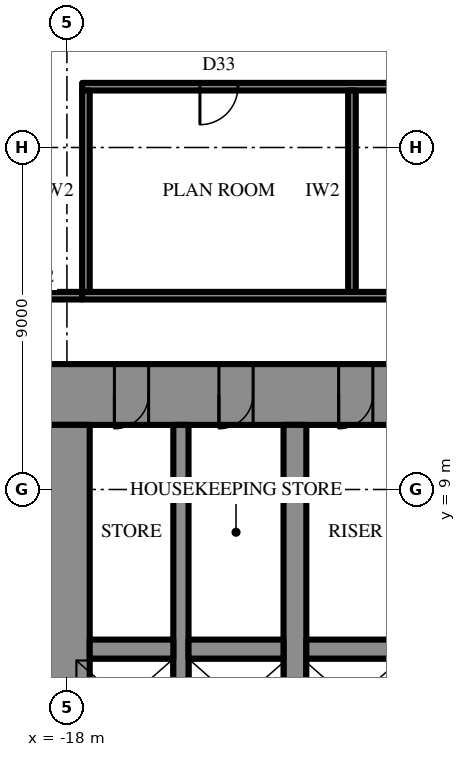
"""IFC4 building model, lengths in metres.
Left out: names, types, materials, properties, quantities, classifications, styles, units other than length and angle.
Written with IfcOpenShell. Run it as: python <this file> out.ifc"""

import sys

from ifc_helpers import new_model, si_unit, direction, frame, frame_2d, origin, place, context, subcontext, project, spatial, rectangle, extrude, element, fill, save


model = new_model("IFC4")
c1 = context("Model", 3, precision=1e-05, world=origin(), true_north=direction((0.0, 1.0)))
c2 = subcontext(c1, "Body", "Model", "MODEL_VIEW")
j1 = project(units=[si_unit("LENGTHUNIT", "METRE"), si_unit("PLANEANGLEUNIT", "RADIAN")], contexts=[c1])
p1 = place(None, origin())
s1 = spatial("IfcSite", under=j1, at=p1, CompositionType="ELEMENT")
p2 = place(p1, origin())
s2 = spatial("IfcBuilding", under=s1, at=p2, CompositionType="ELEMENT")
p3 = place(p2, frame((0.0, 0.0, 52.9)))
s3 = spatial("IfcBuildingStorey", under=s2, at=p3, CompositionType="ELEMENT", Elevation=52.9)
p4 = place(p3, frame((-18.6, 11.5, 0.0), z_axis=(0.0, 0.0, 1.0), x_axis=(1.0, 0.0, 0.0)))
e1 = element("IfcWall", 1, at=p4, inside=s3, PredefinedType="SHEAR", context=c2, shape_type="SweptSolid", body=[
    extrude(rectangle(XDim=37.2, YDim=1.6, at=frame_2d((18.6, 0.0))), origin(), (0.0, 0.0, 1.0), 4.2),
])
p5 = place(p4, frame((19.45, 0.0, 0.0)))
e2 = element("IfcOpeningElement", 2, at=p5, cuts=e1, PredefinedType="OPENING", context=c2, shape_type="SweptSolid", body=[
    extrude(rectangle(XDim=0.9, YDim=2.2, at=frame_2d((0.45, 1.1))), frame((0.0, 0.81, 0.0), z_axis=(0.0, -1.0, 0.0), x_axis=(1.0, 0.0, 0.0)), (0.0, 0.0, 1.0), 1.62),
])
p6 = place(p4, frame((22.45, 0.0, 0.0)))
e3 = element("IfcOpeningElement", 3, at=p6, cuts=e1, PredefinedType="OPENING", context=c2, shape_type="SweptSolid", body=[
    extrude(rectangle(XDim=0.9, YDim=2.2, at=frame_2d((0.45, 1.1))), frame((0.0, 0.81, 0.0), z_axis=(0.0, -1.0, 0.0), x_axis=(1.0, 0.0, 0.0)), (0.0, 0.0, 1.0), 1.62),
])
p7 = place(p4, frame((25.5, 0.0, 0.0)))
e4 = element("IfcOpeningElement", 4, at=p7, cuts=e1, PredefinedType="OPENING", context=c2, shape_type="SweptSolid", body=[
    extrude(rectangle(XDim=1.0, YDim=2.2, at=frame_2d((0.5, 1.1))), frame((0.0, 0.81, 0.0), z_axis=(0.0, -1.0, 0.0), x_axis=(1.0, 0.0, 0.0)), (0.0, 0.0, 1.0), 1.62),
])
p8 = place(p4, frame((1.85, 0.0, 0.0)))
e5 = element("IfcOpeningElement", 5, at=p8, cuts=e1, PredefinedType="OPENING", context=c2, shape_type="SweptSolid", body=[
    extrude(rectangle(XDim=0.9, YDim=2.2, at=frame_2d((0.45, 1.1))), frame((0.0, 0.81, 0.0), z_axis=(0.0, -1.0, 0.0), x_axis=(1.0, 0.0, 0.0)), (0.0, 0.0, 1.0), 1.62),
])
p9 = place(p4, frame((4.6, 0.0, 0.0)))
e6 = element("IfcOpeningElement", 6, at=p9, cuts=e1, PredefinedType="OPENING", context=c2, shape_type="SweptSolid", body=[
    extrude(rectangle(XDim=0.9, YDim=2.2, at=frame_2d((0.45, 1.1))), frame((0.0, 0.81, 0.0), z_axis=(0.0, -1.0, 0.0), x_axis=(1.0, 0.0, 0.0)), (0.0, 0.0, 1.0), 1.62),
])
p10 = place(p4, frame((7.75, 0.0, 0.0)))
e7 = element("IfcOpeningElement", 7, at=p10, cuts=e1, PredefinedType="OPENING", context=c2, shape_type="SweptSolid", body=[
    extrude(rectangle(XDim=0.9, YDim=2.2, at=frame_2d((0.45, 1.1))), frame((0.0, 0.81, 0.0), z_axis=(0.0, -1.0, 0.0), x_axis=(1.0, 0.0, 0.0)), (0.0, 0.0, 1.0), 1.62),
])
p11 = place(p4, frame((28.55, 0.0, 0.0)))
e8 = element("IfcOpeningElement", 8, at=p11, cuts=e1, PredefinedType="OPENING", context=c2, shape_type="SweptSolid", body=[
    extrude(rectangle(XDim=0.9, YDim=2.2, at=frame_2d((0.45, 1.1))), frame((0.0, 0.81, 0.0), z_axis=(0.0, -1.0, 0.0), x_axis=(1.0, 0.0, 0.0)), (0.0, 0.0, 1.0), 1.62),
])
p12 = place(p4, frame((31.7, 0.0, 0.0)))
e9 = element("IfcOpeningElement", 9, at=p12, cuts=e1, PredefinedType="OPENING", context=c2, shape_type="SweptSolid", body=[
    extrude(rectangle(XDim=0.9, YDim=2.2, at=frame_2d((0.45, 1.1))), frame((0.0, 0.81, 0.0), z_axis=(0.0, -1.0, 0.0), x_axis=(1.0, 0.0, 0.0)), (0.0, 0.0, 1.0), 1.62),
])
p13 = place(p4, frame((34.45, 0.0, 0.0)))
e10 = element("IfcOpeningElement", 10, at=p13, cuts=e1, PredefinedType="OPENING", context=c2, shape_type="SweptSolid", body=[
    extrude(rectangle(XDim=0.9, YDim=2.2, at=frame_2d((0.45, 1.1))), frame((0.0, 0.81, 0.0), z_axis=(0.0, -1.0, 0.0), x_axis=(1.0, 0.0, 0.0)), (0.0, 0.0, 1.0), 1.62),
])
p14 = place(p3, frame((-18.0, 10.7, 0.0), z_axis=(0.0, 0.0, 1.0), x_axis=(0.0, -1.0, 0.0)))
e11 = element("IfcWall", 11, at=p14, inside=s3, PredefinedType="SHEAR", context=c2, shape_type="SweptSolid", body=[
    extrude(rectangle(XDim=21.4, YDim=1.2, at=frame_2d((10.7, 0.0))), origin(), (0.0, 0.0, 1.0), 4.2),
])
p15 = place(p14, frame((9.8, 0.0, 0.0)))
e12 = element("IfcOpeningElement", 12, at=p15, cuts=e11, PredefinedType="OPENING", context=c2, shape_type="SweptSolid", body=[
    extrude(rectangle(XDim=1.8, YDim=2.4, at=frame_2d((0.9, 1.2))), frame((0.0, 0.61, 0.0), z_axis=(0.0, -1.0, 0.0), x_axis=(1.0, 0.0, 0.0)), (0.0, 0.0, 1.0), 1.22),
])
p16 = place(p3, frame((-12.0, -10.7, 0.0), z_axis=(0.0, 0.0, 1.0), x_axis=(0.0, 1.0, 0.0)))
e13 = element("IfcWall", 13, at=p16, inside=s3, PredefinedType="SHEAR", context=c2, shape_type="SweptSolid", body=[
    extrude(rectangle(XDim=21.4, YDim=0.6, at=frame_2d((10.7, 0.0))), origin(), (0.0, 0.0, 1.0), 4.2),
])
p17 = place(p16, frame((9.8, 0.0, 0.0)))
e14 = element("IfcOpeningElement", 14, at=p17, cuts=e13, PredefinedType="OPENING", context=c2, shape_type="SweptSolid", body=[
    extrude(rectangle(XDim=1.8, YDim=2.4, at=frame_2d((0.9, 1.2))), frame((0.0, 0.31, 0.0), z_axis=(0.0, -1.0, 0.0), x_axis=(1.0, 0.0, 0.0)), (0.0, 0.0, 1.0), 0.62),
])
p18 = place(p3, frame((-15.0, -10.7, 0.0), z_axis=(0.0, 0.0, 1.0), x_axis=(0.0, 1.0, 0.0)))
e15 = element("IfcWall", 15, at=p18, inside=s3, PredefinedType="SHEAR", context=c2, shape_type="SweptSolid", body=[
    extrude(rectangle(XDim=21.4, YDim=0.4, at=frame_2d((10.7, 0.0))), origin(), (0.0, 0.0, 1.0), 4.2),
])
p19 = place(p18, frame((9.8, 0.0, 0.0)))
e16 = element("IfcOpeningElement", 16, at=p19, cuts=e15, PredefinedType="OPENING", context=c2, shape_type="SweptSolid", body=[
    extrude(rectangle(XDim=1.8, YDim=2.4, at=frame_2d((0.9, 1.2))), frame((0.0, 0.21, 0.0), z_axis=(0.0, -1.0, 0.0), x_axis=(1.0, 0.0, 0.0)), (0.0, 0.0, 1.0), 0.42),
])
p20 = place(p3, frame((-17.4, 4.8, 0.0), z_axis=(0.0, 0.0, 1.0), x_axis=(1.0, 0.0, 0.0)))
e17 = element("IfcWall", 17, at=p20, inside=s3, PredefinedType="SHEAR", context=c2, shape_type="SweptSolid", body=[
    extrude(rectangle(XDim=2.2, YDim=0.5, at=frame_2d((1.1, 0.0))), origin(), (0.0, 0.0, 1.0), 4.2),
])
p21 = place(p3, frame((-14.8, 4.8, 0.0), z_axis=(0.0, 0.0, 1.0), x_axis=(1.0, 0.0, 0.0)))
e18 = element("IfcWall", 18, at=p21, inside=s3, PredefinedType="SHEAR", context=c2, shape_type="SweptSolid", body=[
    extrude(rectangle(XDim=2.5, YDim=0.5, at=frame_2d((1.25, 0.0))), origin(), (0.0, 0.0, 1.0), 4.2),
])
p22 = place(p3, frame((-11.7, 4.8, 0.0), z_axis=(0.0, 0.0, 1.0), x_axis=(1.0, 0.0, 0.0)))
e19 = element("IfcWall", 19, at=p22, inside=s3, PredefinedType="SHEAR", context=c2, shape_type="SweptSolid", body=[
    extrude(rectangle(XDim=23.4, YDim=0.5, at=frame_2d((11.7, 0.0))), origin(), (0.0, 0.0, 1.0), 4.2),
])
p23 = place(p22, frame((6.6, 0.0, 0.0)))
e20 = element("IfcOpeningElement", 20, at=p23, cuts=e19, PredefinedType="OPENING", context=c2, shape_type="SweptSolid", body=[
    extrude(rectangle(XDim=1.2, YDim=2.2, at=frame_2d((0.6, 1.1))), frame((0.0, 0.26, 0.0), z_axis=(0.0, -1.0, 0.0), x_axis=(1.0, 0.0, 0.0)), (0.0, 0.0, 1.0), 0.52),
])
p24 = place(p22, frame((3.6, 0.0, 0.0)))
e21 = element("IfcOpeningElement", 21, at=p24, cuts=e19, PredefinedType="OPENING", context=c2, shape_type="SweptSolid", body=[
    extrude(rectangle(XDim=1.2, YDim=2.2, at=frame_2d((0.6, 1.1))), frame((0.0, 0.26, 0.0), z_axis=(0.0, -1.0, 0.0), x_axis=(1.0, 0.0, 0.0)), (0.0, 0.0, 1.0), 0.52),
])
p25 = place(p3, frame((-17.6, 14.1, 0.0), z_axis=(0.0, 0.0, 1.0), x_axis=(1.0, 0.0, 0.0)))
e22 = element("IfcWall", 22, at=p25, inside=s3, PredefinedType="PARTITIONING", context=c2, shape_type="SweptSolid", body=[
    extrude(rectangle(XDim=35.2, YDim=0.2, at=frame_2d((17.6, 0.0))), origin(), (0.0, 0.0, 1.0), 4.0),
])
p26 = place(p3, frame((-17.6, 19.6, 0.0), z_axis=(0.0, 0.0, 1.0), x_axis=(1.0, 0.0, 0.0)))
e23 = element("IfcWall", 23, at=p26, inside=s3, PredefinedType="PARTITIONING", context=c2, shape_type="SweptSolid", body=[
    extrude(rectangle(XDim=35.2, YDim=0.2, at=frame_2d((17.6, 0.0))), origin(), (0.0, 0.0, 1.0), 4.0),
])
p27 = place(p26, frame((3.1, 0.0, 0.0)))
e24 = element("IfcOpeningElement", 24, at=p27, cuts=e23, PredefinedType="OPENING", context=c2, shape_type="SweptSolid", body=[
    extrude(rectangle(XDim=1.0, YDim=2.2, at=frame_2d((0.5, 1.1))), frame((0.0, 0.11, 0.0), z_axis=(0.0, -1.0, 0.0), x_axis=(1.0, 0.0, 0.0)), (0.0, 0.0, 1.0), 0.22),
])
p28 = place(p26, frame((10.1, 0.0, 0.0)))
e25 = element("IfcOpeningElement", 25, at=p28, cuts=e23, PredefinedType="OPENING", context=c2, shape_type="SweptSolid", body=[
    extrude(rectangle(XDim=1.0, YDim=2.2, at=frame_2d((0.5, 1.1))), frame((0.0, 0.11, 0.0), z_axis=(0.0, -1.0, 0.0), x_axis=(1.0, 0.0, 0.0)), (0.0, 0.0, 1.0), 0.22),
])
p29 = place(p26, frame((17.1, 0.0, 0.0)))
e26 = element("IfcOpeningElement", 26, at=p29, cuts=e23, PredefinedType="OPENING", context=c2, shape_type="SweptSolid", body=[
    extrude(rectangle(XDim=1.0, YDim=2.2, at=frame_2d((0.5, 1.1))), frame((0.0, 0.11, 0.0), z_axis=(0.0, -1.0, 0.0), x_axis=(1.0, 0.0, 0.0)), (0.0, 0.0, 1.0), 0.22),
])
p30 = place(p26, frame((24.1, 0.0, 0.0)))
e27 = element("IfcOpeningElement", 27, at=p30, cuts=e23, PredefinedType="OPENING", context=c2, shape_type="SweptSolid", body=[
    extrude(rectangle(XDim=1.0, YDim=2.2, at=frame_2d((0.5, 1.1))), frame((0.0, 0.11, 0.0), z_axis=(0.0, -1.0, 0.0), x_axis=(1.0, 0.0, 0.0)), (0.0, 0.0, 1.0), 0.22),
])
p31 = place(p26, frame((31.1, 0.0, 0.0)))
e28 = element("IfcOpeningElement", 28, at=p31, cuts=e23, PredefinedType="OPENING", context=c2, shape_type="SweptSolid", body=[
    extrude(rectangle(XDim=1.0, YDim=2.2, at=frame_2d((0.5, 1.1))), frame((0.0, 0.11, 0.0), z_axis=(0.0, -1.0, 0.0), x_axis=(1.0, 0.0, 0.0)), (0.0, 0.0, 1.0), 0.22),
])
for number, where, z_axis, x_axis in (
    (29, (-17.5, 14.2, 0.0), (0.0, 0.0, 1.0), (0.0, 1.0, 0.0)),
    (30, (-10.5, 14.2, 0.0), (0.0, 0.0, 1.0), (0.0, 1.0, 0.0)),
):
    element("IfcWall", number, at=place(p3, frame(where, z_axis=z_axis, x_axis=x_axis)), inside=s3, PredefinedType="PARTITIONING", context=c2, shape_type="SweptSolid", body=[
        extrude(rectangle(XDim=5.3, YDim=0.2, at=frame_2d((2.65, 0.0))), origin(), (0.0, 0.0, 1.0), 4.0),
    ])
p32 = place(p3, frame((-20.0, 14.1, 0.0), z_axis=(0.0, 0.0, 1.0), x_axis=(1.0, 0.0, 0.0)))
e31 = element("IfcWall", 31, at=p32, inside=s3, PredefinedType="PARTITIONING", context=c2, shape_type="SweptSolid", body=[
    extrude(rectangle(XDim=2.4, YDim=0.2, at=frame_2d((1.2, 0.0))), origin(), (0.0, 0.0, 1.0), 4.0),
])
p33 = place(p8, frame((0.9, 0.0, 0.0), z_axis=(0.0, 0.0, 1.0), x_axis=(-1.0, 0.0, 0.0)))
e32 = element("IfcDoor", 32, at=p33, inside=s3, OperationType="SINGLE_SWING_LEFT", PredefinedType="DOOR", context=c2, shape_type="SweptSolid", body=[
    extrude(rectangle(XDim=0.9, YDim=2.2, at=frame_2d((0.45, 1.1))), frame((0.0, 0.025, 0.0), z_axis=(0.0, -1.0, 0.0), x_axis=(1.0, 0.0, 0.0)), (0.0, 0.0, 1.0), 0.05),
])
fill(e5, e32)
p34 = place(p9, frame((0.9, 0.0, 0.0), z_axis=(0.0, 0.0, 1.0), x_axis=(-1.0, 0.0, 0.0)))
e33 = element("IfcDoor", 33, at=p34, inside=s3, OperationType="SINGLE_SWING_LEFT", PredefinedType="DOOR", context=c2, shape_type="SweptSolid", body=[
    extrude(rectangle(XDim=0.9, YDim=2.2, at=frame_2d((0.45, 1.1))), frame((0.0, 0.025, 0.0), z_axis=(0.0, -1.0, 0.0), x_axis=(1.0, 0.0, 0.0)), (0.0, 0.0, 1.0), 0.05),
])
fill(e6, e33)
p35 = place(p10, frame((0.9, 0.0, 0.0), z_axis=(0.0, 0.0, 1.0), x_axis=(-1.0, 0.0, 0.0)))
e34 = element("IfcDoor", 34, at=p35, inside=s3, OperationType="SINGLE_SWING_LEFT", PredefinedType="DOOR", context=c2, shape_type="SweptSolid", body=[
    extrude(rectangle(XDim=0.9, YDim=2.2, at=frame_2d((0.45, 1.1))), frame((0.0, 0.025, 0.0), z_axis=(0.0, -1.0, 0.0), x_axis=(1.0, 0.0, 0.0)), (0.0, 0.0, 1.0), 0.05),
])
fill(e7, e34)
p36 = place(p27, frame((1.0, 0.0, 0.0), z_axis=(0.0, 0.0, 1.0), x_axis=(-1.0, 0.0, 0.0)))
e35 = element("IfcDoor", 35, at=p36, inside=s3, OperationType="SINGLE_SWING_LEFT", PredefinedType="DOOR", context=c2, shape_type="SweptSolid", body=[
    extrude(rectangle(XDim=1.0, YDim=2.2, at=frame_2d((0.5, 1.1))), frame((0.0, 0.025, 0.0), z_axis=(0.0, -1.0, 0.0), x_axis=(1.0, 0.0, 0.0)), (0.0, 0.0, 1.0), 0.05),
])
fill(e24, e35)
save(model, sys.argv[1])
